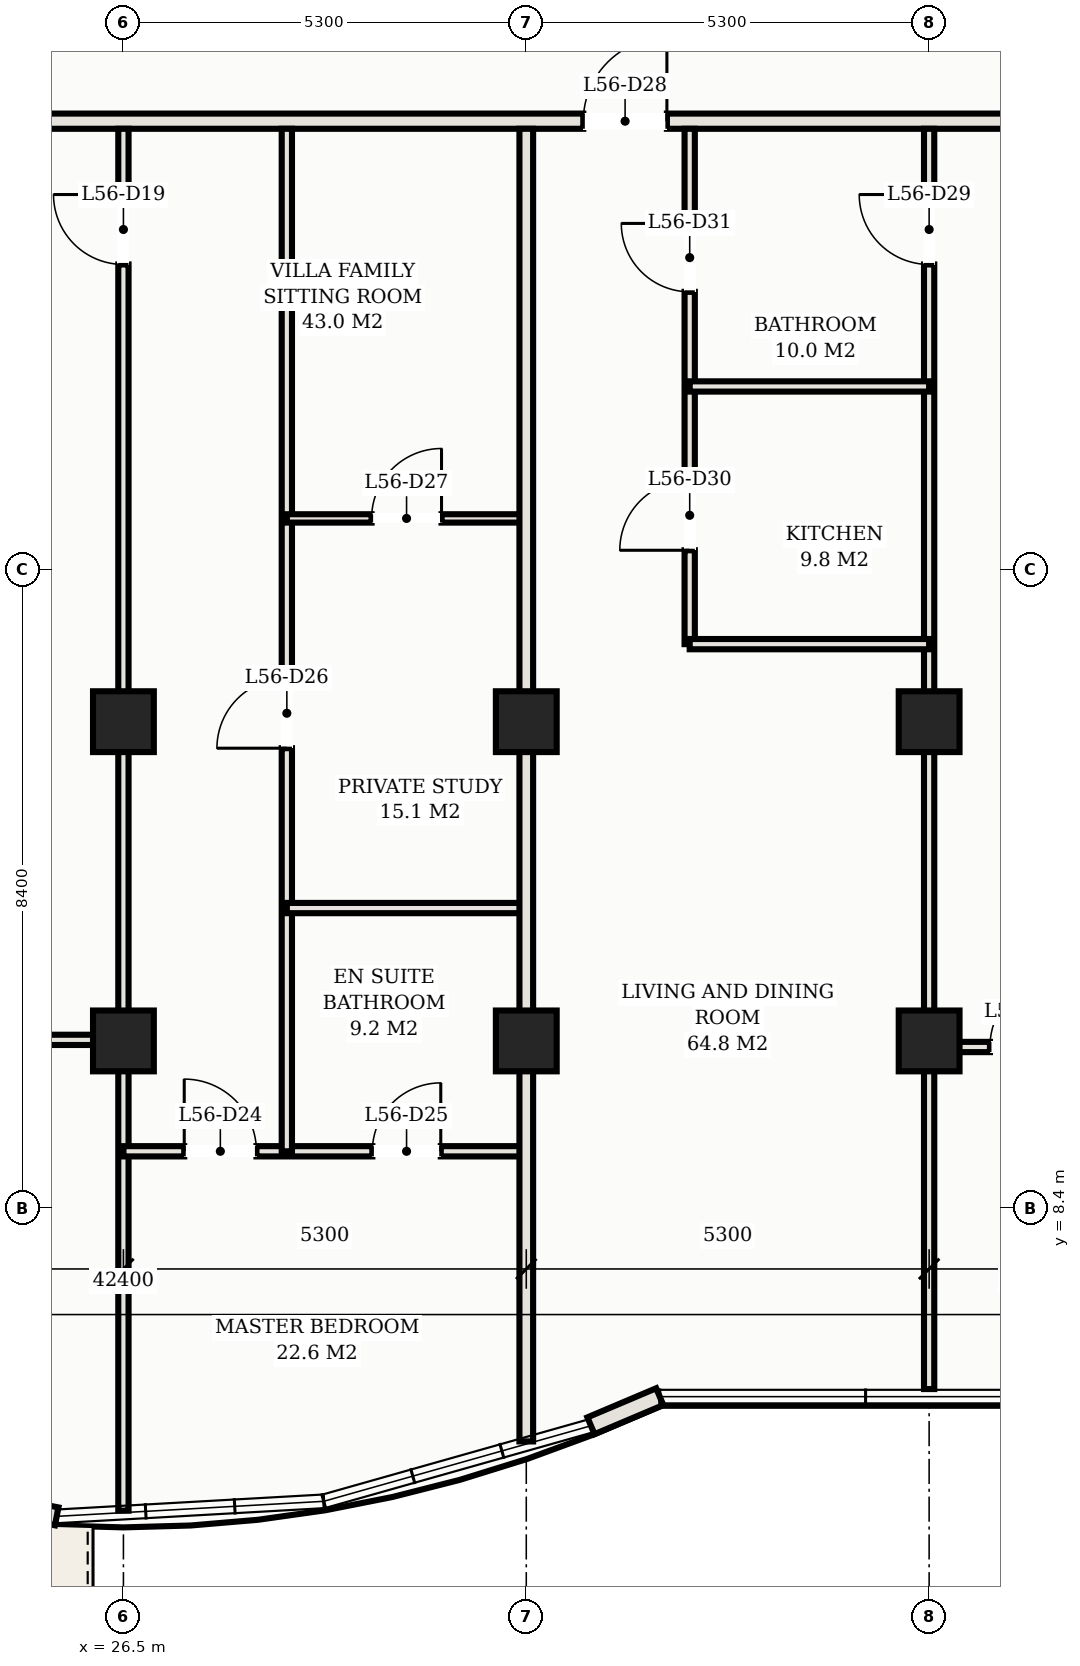
"""IFC4 building model, lengths in metres.
Left out: names, types, materials, properties, quantities, classifications, styles, units other than length and angle.
Written with IfcOpenShell. Run it as: python <this file> out.ifc"""

import sys

from ifc_helpers import new_model, si_unit, direction, frame, frame_2d, origin, origin_2d, place, context, subcontext, project, spatial, rectangle, hollow_rectangle, extrude, element, fill, save


model = new_model("IFC4")
c1 = context("Model", 3, precision=1e-05, world=origin(), true_north=direction((0.0, 1.0)))
c2 = subcontext(c1, "Body", "Model", "MODEL_VIEW")
j1 = project(units=[si_unit("LENGTHUNIT", "METRE"), si_unit("PLANEANGLEUNIT", "RADIAN")], contexts=[c1])
p1 = place(None, origin())
s1 = spatial("IfcSite", under=j1, at=p1, CompositionType="ELEMENT")
p2 = place(p1, origin())
s2 = spatial("IfcBuilding", under=s1, at=p2, CompositionType="ELEMENT")
p3 = place(p2, frame((0.0, 0.0, 206.6)))
s3 = spatial("IfcBuildingStorey", under=s2, at=p3, CompositionType="ELEMENT", Elevation=206.6)
for number, where, z_axis, x_axis in (
    (1, (26.5, 14.8, 0.0), (0.0, 0.0, 1.0), (1.0, 0.0, 0.0)),
    (2, (26.5, 10.6, 0.0), (0.0, 0.0, 1.0), (1.0, 0.0, 0.0)),
    (3, (31.8, 14.8, 0.0), (0.0, 0.0, 1.0), (1.0, 0.0, 0.0)),
    (4, (31.8, 10.6, 0.0), (0.0, 0.0, 1.0), (1.0, 0.0, 0.0)),
    (5, (37.1, 14.8, 0.0), (0.0, 0.0, 1.0), (1.0, 0.0, 0.0)),
    (6, (37.1, 10.6, 0.0), (0.0, 0.0, 1.0), (1.0, 0.0, 0.0)),
):
    element("IfcColumn", number, at=place(p3, frame(where, z_axis=z_axis, x_axis=x_axis)), inside=s3, PredefinedType="COLUMN", context=c2, shape_type="SweptSolid", body=[
        extrude(hollow_rectangle(XDim=0.8, YDim=0.8, WallThickness=0.028, at=origin_2d()), origin(), (0.0, 0.0, 1.0), 3.3),
    ])
p4 = place(p3, frame((21.229, 5.214, 0.0), z_axis=(0.0, 0.0, 1.0), x_axis=(0.980985349685, -0.194081796425, 0.0)))
e7 = element("IfcWall", 7, at=p4, inside=s3, PredefinedType="SOLIDWALL", context=c2, shape_type="SweptSolid", body=[
    extrude(rectangle(XDim=4.478, YDim=0.24, at=frame_2d((2.239, 0.0))), origin(), (0.0, 0.0, 1.0), 3.11),
])
p5 = place(p4, frame((1.473, 0.0, 0.0)))
e8 = element("IfcOpeningElement", 8, at=p5, cuts=e7, PredefinedType="OPENING", context=c2, shape_type="SweptSolid", body=[
    extrude(rectangle(XDim=1.8, YDim=2.2, at=frame_2d((0.9, 1.1))), frame((0.0, 0.13, 0.0), z_axis=(0.0, -1.0, 0.0), x_axis=(1.0, 0.0, 0.0)), (0.0, 0.0, 1.0), 0.26),
])
p6 = place(p3, frame((32.651, 5.537, 0.0), z_axis=(0.0, 0.0, 1.0), x_axis=(0.920998109395, 0.389567044924, 0.0)))
e9 = element("IfcWall", 9, at=p6, inside=s3, PredefinedType="SOLIDWALL", context=c2, shape_type="SweptSolid", body=[
    extrude(rectangle(XDim=0.983, YDim=0.24, at=frame_2d((0.491, 0.0))), origin(), (0.0, 0.0, 1.0), 3.11),
])
p7 = place(p3, frame((6.72, 22.7, 0.0), z_axis=(0.0, 0.0, 1.0), x_axis=(1.0, 0.0, 0.0)))
e10 = element("IfcWall", 10, at=p7, inside=s3, PredefinedType="PARTITIONING", context=c2, shape_type="SweptSolid", body=[
    extrude(rectangle(XDim=39.56, YDim=0.2, at=frame_2d((19.78, 0.0))), origin(), (0.0, 0.0, 1.0), 2.43),
])
p8 = place(p7, frame((4.63, 0.0, 0.0)))
e11 = element("IfcOpeningElement", 11, at=p8, cuts=e10, PredefinedType="OPENING", context=c2, shape_type="SweptSolid", body=[
    extrude(rectangle(XDim=1.1, YDim=2.25, at=frame_2d((0.55, 1.125))), frame((0.0, 0.11, 0.0), z_axis=(0.0, -1.0, 0.0), x_axis=(1.0, 0.0, 0.0)), (0.0, 0.0, 1.0), 0.22),
])
p9 = place(p7, frame((9.93, 0.0, 0.0)))
e12 = element("IfcOpeningElement", 12, at=p9, cuts=e10, PredefinedType="OPENING", context=c2, shape_type="SweptSolid", body=[
    extrude(rectangle(XDim=1.1, YDim=2.25, at=frame_2d((0.55, 1.125))), frame((0.0, 0.11, 0.0), z_axis=(0.0, -1.0, 0.0), x_axis=(1.0, 0.0, 0.0)), (0.0, 0.0, 1.0), 0.22),
])
p10 = place(p7, frame((25.83, 0.0, 0.0)))
e13 = element("IfcOpeningElement", 13, at=p10, cuts=e10, PredefinedType="OPENING", context=c2, shape_type="SweptSolid", body=[
    extrude(rectangle(XDim=1.1, YDim=2.25, at=frame_2d((0.55, 1.125))), frame((0.0, 0.11, 0.0), z_axis=(0.0, -1.0, 0.0), x_axis=(1.0, 0.0, 0.0)), (0.0, 0.0, 1.0), 0.22),
])
p11 = place(p7, frame((1.435, 0.0, 0.0)))
e14 = element("IfcOpeningElement", 14, at=p11, cuts=e10, PredefinedType="OPENING", context=c2, shape_type="SweptSolid", body=[
    extrude(rectangle(XDim=0.92, YDim=2.15, at=frame_2d((0.46, 1.075))), frame((0.0, 0.11, 0.0), z_axis=(0.0, -1.0, 0.0), x_axis=(1.0, 0.0, 0.0)), (0.0, 0.0, 1.0), 0.22),
])
p12 = place(p7, frame((37.205, 0.0, 0.0)))
e15 = element("IfcOpeningElement", 15, at=p12, cuts=e10, PredefinedType="OPENING", context=c2, shape_type="SweptSolid", body=[
    extrude(rectangle(XDim=0.92, YDim=2.15, at=frame_2d((0.46, 1.075))), frame((0.0, 0.11, 0.0), z_axis=(0.0, -1.0, 0.0), x_axis=(1.0, 0.0, 0.0)), (0.0, 0.0, 1.0), 0.22),
])
p13 = place(p3, frame((26.5, 4.42, 0.0), z_axis=(0.0, 0.0, 1.0), x_axis=(0.0, 1.0, 0.0)))
e16 = element("IfcWall", 16, at=p13, inside=s3, PredefinedType="PARTITIONING", context=c2, shape_type="SweptSolid", body=[
    extrude(rectangle(XDim=18.18, YDim=0.135, at=frame_2d((9.09, 0.0))), origin(), (0.0, 0.0, 1.0), 2.43),
])
p14 = place(p13, frame((16.395, 0.0, 0.0)))
e17 = element("IfcOpeningElement", 17, at=p14, cuts=e16, PredefinedType="OPENING", context=c2, shape_type="SweptSolid", body=[
    extrude(rectangle(XDim=0.92, YDim=2.15, at=frame_2d((0.46, 1.075))), frame((0.0, 0.078, 0.0), z_axis=(0.0, -1.0, 0.0), x_axis=(1.0, 0.0, 0.0)), (0.0, 0.0, 1.0), 0.155),
])
p15 = place(p3, frame((15.9, 10.614, 0.0), z_axis=(0.0, 0.0, 1.0), x_axis=(1.0, 0.0, 0.0)))
e18 = element("IfcWall", 18, at=p15, inside=s3, PredefinedType="PARTITIONING", context=c2, shape_type="SweptSolid", body=[
    extrude(rectangle(XDim=10.6, YDim=0.135, at=frame_2d((5.3, 0.0))), origin(), (0.0, 0.0, 1.0), 2.43),
])
p16 = place(p15, frame((0.815, 0.0, 0.0)))
e19 = element("IfcOpeningElement", 19, at=p16, cuts=e18, PredefinedType="OPENING", context=c2, shape_type="SweptSolid", body=[
    extrude(rectangle(XDim=0.92, YDim=2.15, at=frame_2d((0.46, 1.075))), frame((0.0, 0.078, 0.0), z_axis=(0.0, -1.0, 0.0), x_axis=(1.0, 0.0, 0.0)), (0.0, 0.0, 1.0), 0.155),
])
p17 = place(p3, frame((26.5, 9.148, 0.0), z_axis=(0.0, 0.0, 1.0), x_axis=(1.0, 0.0, 0.0)))
e20 = element("IfcWall", 20, at=p17, inside=s3, PredefinedType="PARTITIONING", context=c2, shape_type="SweptSolid", body=[
    extrude(rectangle(XDim=5.3, YDim=0.135, at=frame_2d((2.65, 0.0))), origin(), (0.0, 0.0, 1.0), 2.43),
])
p18 = place(p17, frame((0.8, 0.0, 0.0)))
e21 = element("IfcOpeningElement", 21, at=p18, cuts=e20, PredefinedType="OPENING", context=c2, shape_type="SweptSolid", body=[
    extrude(rectangle(XDim=0.95, YDim=2.15, at=frame_2d((0.475, 1.075))), frame((0.0, 0.078, 0.0), z_axis=(0.0, -1.0, 0.0), x_axis=(1.0, 0.0, 0.0)), (0.0, 0.0, 1.0), 0.155),
])
p19 = place(p17, frame((3.275, 0.0, 0.0)))
e22 = element("IfcOpeningElement", 22, at=p19, cuts=e20, PredefinedType="OPENING", context=c2, shape_type="SweptSolid", body=[
    extrude(rectangle(XDim=0.9, YDim=2.15, at=frame_2d((0.45, 1.075))), frame((0.0, 0.078, 0.0), z_axis=(0.0, -1.0, 0.0), x_axis=(1.0, 0.0, 0.0)), (0.0, 0.0, 1.0), 0.155),
])
p20 = place(p3, frame((28.65, 9.148, 0.0), z_axis=(0.0, 0.0, 1.0), x_axis=(0.0, 1.0, 0.0)))
e23 = element("IfcWall", 23, at=p20, inside=s3, PredefinedType="PARTITIONING", context=c2, shape_type="SweptSolid", body=[
    extrude(rectangle(XDim=13.452, YDim=0.135, at=frame_2d((6.726, 0.0))), origin(), (0.0, 0.0, 1.0), 2.43),
])
p21 = place(p20, frame((5.303, 0.0, 0.0)))
e24 = element("IfcOpeningElement", 24, at=p21, cuts=e23, PredefinedType="OPENING", context=c2, shape_type="SweptSolid", body=[
    extrude(rectangle(XDim=0.92, YDim=2.15, at=frame_2d((0.46, 1.075))), frame((0.0, 0.078, 0.0), z_axis=(0.0, -1.0, 0.0), x_axis=(1.0, 0.0, 0.0)), (0.0, 0.0, 1.0), 0.155),
])
p22 = place(p3, frame((28.65, 12.348, 0.0), z_axis=(0.0, 0.0, 1.0), x_axis=(1.0, 0.0, 0.0)))
e25 = element("IfcWall", 25, at=p22, inside=s3, PredefinedType="PARTITIONING", context=c2, shape_type="SweptSolid", body=[
    extrude(rectangle(XDim=3.15, YDim=0.135, at=frame_2d((1.575, 0.0))), origin(), (0.0, 0.0, 1.0), 2.43),
])
p23 = place(p3, frame((28.65, 17.474, 0.0), z_axis=(0.0, 0.0, 1.0), x_axis=(1.0, 0.0, 0.0)))
e26 = element("IfcWall", 26, at=p23, inside=s3, PredefinedType="MOVABLE", context=c2, shape_type="SweptSolid", body=[
    extrude(rectangle(XDim=3.15, YDim=0.11, at=frame_2d((1.575, 0.0))), origin(), (0.0, 0.0, 1.0), 2.43),
])
p24 = place(p23, frame((1.115, 0.0, 0.0)))
e27 = element("IfcOpeningElement", 27, at=p24, cuts=e26, PredefinedType="OPENING", context=c2, shape_type="SweptSolid", body=[
    extrude(rectangle(XDim=0.92, YDim=2.15, at=frame_2d((0.46, 1.075))), frame((0.0, 0.065, 0.0), z_axis=(0.0, -1.0, 0.0), x_axis=(1.0, 0.0, 0.0)), (0.0, 0.0, 1.0), 0.13),
])
p25 = place(p3, frame((31.8, 5.331, 0.0), z_axis=(0.0, 0.0, 1.0), x_axis=(0.0, 1.0, 0.0)))
e28 = element("IfcWall", 28, at=p25, inside=s3, PredefinedType="PARTITIONING", context=c2, shape_type="SweptSolid", body=[
    extrude(rectangle(XDim=17.269, YDim=0.18, at=frame_2d((8.635, 0.0))), origin(), (0.0, 0.0, 1.0), 2.43),
])
p26 = place(p3, frame((37.1, 6.02, 0.0), z_axis=(0.0, 0.0, 1.0), x_axis=(0.0, 1.0, 0.0)))
e29 = element("IfcWall", 29, at=p26, inside=s3, PredefinedType="PARTITIONING", context=c2, shape_type="SweptSolid", body=[
    extrude(rectangle(XDim=16.58, YDim=0.135, at=frame_2d((8.29, 0.0))), origin(), (0.0, 0.0, 1.0), 2.43),
])
p27 = place(p26, frame((14.795, 0.0, 0.0)))
e30 = element("IfcOpeningElement", 30, at=p27, cuts=e29, PredefinedType="OPENING", context=c2, shape_type="SweptSolid", body=[
    extrude(rectangle(XDim=0.92, YDim=2.15, at=frame_2d((0.46, 1.075))), frame((0.0, 0.078, 0.0), z_axis=(0.0, -1.0, 0.0), x_axis=(1.0, 0.0, 0.0)), (0.0, 0.0, 1.0), 0.155),
])
p28 = place(p3, frame((33.95, 15.82, 0.0), z_axis=(0.0, 0.0, 1.0), x_axis=(0.0, 1.0, 0.0)))
e31 = element("IfcWall", 31, at=p28, inside=s3, PredefinedType="PARTITIONING", context=c2, shape_type="SweptSolid", body=[
    extrude(rectangle(XDim=6.78, YDim=0.135, at=frame_2d((3.39, 0.0))), origin(), (0.0, 0.0, 1.0), 2.43),
])
p29 = place(p28, frame((1.235, 0.0, 0.0)))
e32 = element("IfcOpeningElement", 32, at=p29, cuts=e31, PredefinedType="OPENING", context=c2, shape_type="SweptSolid", body=[
    extrude(rectangle(XDim=0.92, YDim=2.15, at=frame_2d((0.46, 1.075))), frame((0.0, 0.078, 0.0), z_axis=(0.0, -1.0, 0.0), x_axis=(1.0, 0.0, 0.0)), (0.0, 0.0, 1.0), 0.155),
])
p30 = place(p28, frame((4.635, 0.0, 0.0)))
e33 = element("IfcOpeningElement", 33, at=p30, cuts=e31, PredefinedType="OPENING", context=c2, shape_type="SweptSolid", body=[
    extrude(rectangle(XDim=0.9, YDim=2.15, at=frame_2d((0.45, 1.075))), frame((0.0, 0.078, 0.0), z_axis=(0.0, -1.0, 0.0), x_axis=(1.0, 0.0, 0.0)), (0.0, 0.0, 1.0), 0.155),
])
for number, where, z_axis, x_axis in (
    (34, (33.95, 15.82, 0.0), (0.0, 0.0, 1.0), (1.0, 0.0, 0.0)),
    (35, (33.95, 19.21, 0.0), (0.0, 0.0, 1.0), (1.0, 0.0, 0.0)),
):
    element("IfcWall", number, at=place(p3, frame(where, z_axis=z_axis, x_axis=x_axis)), inside=s3, PredefinedType="PARTITIONING", context=c2, shape_type="SweptSolid", body=[
        extrude(rectangle(XDim=3.15, YDim=0.135, at=frame_2d((1.575, 0.0))), origin(), (0.0, 0.0, 1.0), 2.43),
    ])
p31 = place(p3, frame((37.1, 10.52, 0.0), z_axis=(0.0, 0.0, 1.0), x_axis=(1.0, 0.0, 0.0)))
e36 = element("IfcWall", 36, at=p31, inside=s3, PredefinedType="PARTITIONING", context=c2, shape_type="SweptSolid", body=[
    extrude(rectangle(XDim=5.3, YDim=0.135, at=frame_2d((2.65, 0.0))), origin(), (0.0, 0.0, 1.0), 2.43),
])
p32 = place(p31, frame((0.8, 0.0, 0.0)))
e37 = element("IfcOpeningElement", 37, at=p32, cuts=e36, PredefinedType="OPENING", context=c2, shape_type="SweptSolid", body=[
    extrude(rectangle(XDim=0.95, YDim=2.15, at=frame_2d((0.475, 1.075))), frame((0.0, 0.078, 0.0), z_axis=(0.0, -1.0, 0.0), x_axis=(1.0, 0.0, 0.0)), (0.0, 0.0, 1.0), 0.155),
])
p33 = place(p31, frame((2.625, 0.0, 0.0)))
e38 = element("IfcOpeningElement", 38, at=p33, cuts=e36, PredefinedType="OPENING", context=c2, shape_type="SweptSolid", body=[
    extrude(rectangle(XDim=0.9, YDim=2.15, at=frame_2d((0.45, 1.075))), frame((0.0, 0.078, 0.0), z_axis=(0.0, -1.0, 0.0), x_axis=(1.0, 0.0, 0.0)), (0.0, 0.0, 1.0), 0.155),
])
p34 = place(p14, origin())
e39 = element("IfcDoor", 39, at=p34, inside=s3, OperationType="SINGLE_SWING_RIGHT", PredefinedType="DOOR", context=c2, shape_type="SweptSolid", body=[
    extrude(rectangle(XDim=0.92, YDim=2.15, at=frame_2d((0.46, 1.075))), frame((0.0, 0.025, 0.0), z_axis=(0.0, -1.0, 0.0), x_axis=(1.0, 0.0, 0.0)), (0.0, 0.0, 1.0), 0.05),
])
fill(e17, e39)
p35 = place(p18, origin())
e40 = element("IfcDoor", 40, at=p35, inside=s3, OperationType="SINGLE_SWING_LEFT", PredefinedType="DOOR", context=c2, shape_type="SweptSolid", body=[
    extrude(rectangle(XDim=0.95, YDim=2.15, at=frame_2d((0.475, 1.075))), frame((0.0, 0.025, 0.0), z_axis=(0.0, -1.0, 0.0), x_axis=(1.0, 0.0, 0.0)), (0.0, 0.0, 1.0), 0.05),
])
fill(e21, e40)
p36 = place(p19, origin())
e41 = element("IfcDoor", 41, at=p36, inside=s3, OperationType="SINGLE_SWING_RIGHT", PredefinedType="DOOR", context=c2, shape_type="SweptSolid", body=[
    extrude(rectangle(XDim=0.9, YDim=2.15, at=frame_2d((0.45, 1.075))), frame((0.0, 0.025, 0.0), z_axis=(0.0, -1.0, 0.0), x_axis=(1.0, 0.0, 0.0)), (0.0, 0.0, 1.0), 0.05),
])
fill(e22, e41)
p37 = place(p21, origin())
e42 = element("IfcDoor", 42, at=p37, inside=s3, OperationType="SINGLE_SWING_LEFT", PredefinedType="DOOR", context=c2, shape_type="SweptSolid", body=[
    extrude(rectangle(XDim=0.92, YDim=2.15, at=frame_2d((0.46, 1.075))), frame((0.0, 0.025, 0.0), z_axis=(0.0, -1.0, 0.0), x_axis=(1.0, 0.0, 0.0)), (0.0, 0.0, 1.0), 0.05),
])
fill(e24, e42)
p38 = place(p24, origin())
e43 = element("IfcDoor", 43, at=p38, inside=s3, OperationType="SINGLE_SWING_RIGHT", PredefinedType="DOOR", context=c2, shape_type="SweptSolid", body=[
    extrude(rectangle(XDim=0.92, YDim=2.15, at=frame_2d((0.46, 1.075))), frame((0.0, 0.025, 0.0), z_axis=(0.0, -1.0, 0.0), x_axis=(1.0, 0.0, 0.0)), (0.0, 0.0, 1.0), 0.05),
])
fill(e27, e43)
p39 = place(p10, origin())
e44 = element("IfcDoor", 44, at=p39, inside=s3, OperationType="SINGLE_SWING_RIGHT", PredefinedType="DOOR", context=c2, shape_type="SweptSolid", body=[
    extrude(rectangle(XDim=1.1, YDim=2.25, at=frame_2d((0.55, 1.125))), frame((0.0, 0.025, 0.0), z_axis=(0.0, -1.0, 0.0), x_axis=(1.0, 0.0, 0.0)), (0.0, 0.0, 1.0), 0.05),
])
fill(e13, e44)
p40 = place(p27, origin())
e45 = element("IfcDoor", 45, at=p40, inside=s3, OperationType="SINGLE_SWING_RIGHT", PredefinedType="DOOR", context=c2, shape_type="SweptSolid", body=[
    extrude(rectangle(XDim=0.92, YDim=2.15, at=frame_2d((0.46, 1.075))), frame((0.0, 0.025, 0.0), z_axis=(0.0, -1.0, 0.0), x_axis=(1.0, 0.0, 0.0)), (0.0, 0.0, 1.0), 0.05),
])
fill(e30, e45)
p41 = place(p29, origin())
e46 = element("IfcDoor", 46, at=p41, inside=s3, OperationType="SINGLE_SWING_LEFT", PredefinedType="DOOR", context=c2, shape_type="SweptSolid", body=[
    extrude(rectangle(XDim=0.92, YDim=2.15, at=frame_2d((0.46, 1.075))), frame((0.0, 0.025, 0.0), z_axis=(0.0, -1.0, 0.0), x_axis=(1.0, 0.0, 0.0)), (0.0, 0.0, 1.0), 0.05),
])
fill(e32, e46)
p42 = place(p30, origin())
e47 = element("IfcDoor", 47, at=p42, inside=s3, OperationType="SINGLE_SWING_RIGHT", PredefinedType="DOOR", context=c2, shape_type="SweptSolid", body=[
    extrude(rectangle(XDim=0.9, YDim=2.15, at=frame_2d((0.45, 1.075))), frame((0.0, 0.025, 0.0), z_axis=(0.0, -1.0, 0.0), x_axis=(1.0, 0.0, 0.0)), (0.0, 0.0, 1.0), 0.05),
])
fill(e33, e47)
p43 = place(p32, origin())
e48 = element("IfcDoor", 48, at=p43, inside=s3, OperationType="SINGLE_SWING_RIGHT", PredefinedType="DOOR", context=c2, shape_type="SweptSolid", body=[
    extrude(rectangle(XDim=0.95, YDim=2.15, at=frame_2d((0.475, 1.075))), frame((0.0, 0.025, 0.0), z_axis=(0.0, -1.0, 0.0), x_axis=(1.0, 0.0, 0.0)), (0.0, 0.0, 1.0), 0.05),
])
fill(e37, e48)
save(model, sys.argv[1])
